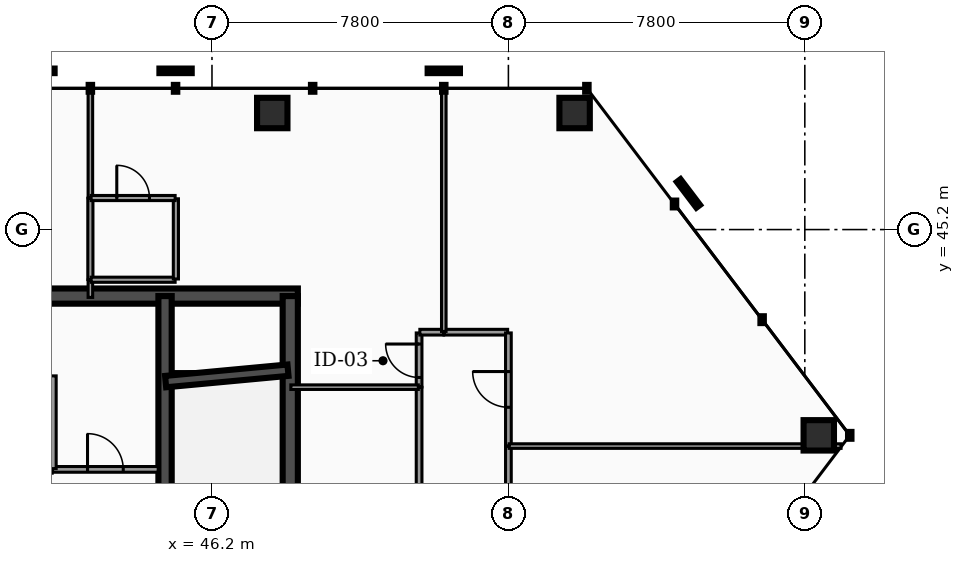
"""IFC4 building model, lengths in metres.
Left out: names, types, materials, properties, quantities, classifications, styles, units other than length and angle.
Written with IfcOpenShell. Run it as: python <this file> out.ifc"""

import sys

from ifc_helpers import new_model, si_unit, direction, frame, frame_2d, origin, origin_2d, place, context, subcontext, project, spatial, rectangle, hollow_rectangle, extrude, element, fill, save


model = new_model("IFC4")
c1 = context("Model", 3, precision=1e-05, world=origin(), true_north=direction((0.0, 1.0)))
c2 = subcontext(c1, "Body", "Model", "MODEL_VIEW")
j1 = project(units=[si_unit("LENGTHUNIT", "METRE"), si_unit("PLANEANGLEUNIT", "RADIAN")], contexts=[c1])
p1 = place(None, origin())
s1 = spatial("IfcSite", under=j1, at=p1, CompositionType="ELEMENT")
p2 = place(p1, origin())
s2 = spatial("IfcBuilding", under=s1, at=p2, CompositionType="ELEMENT")
p3 = place(p2, frame((0.0, 0.0, 160.82)))
s3 = spatial("IfcBuildingStorey", under=s2, at=p3, CompositionType="ELEMENT", Elevation=160.82)
p4 = place(p3, frame((28.4, 43.45, 0.0), z_axis=(0.0, 0.0, 1.0), x_axis=(1.0, 0.0, 0.0)))
e1 = element("IfcWall", 1, at=p4, inside=s3, PredefinedType="SHEAR", context=c2, shape_type="SweptSolid", body=[
    extrude(rectangle(XDim=20.06, YDim=0.4, at=frame_2d((10.03, 0.0))), origin(), (0.0, 0.0, 1.0), 3.5),
])
p5 = place(p3, frame((44.965, 33.25, 0.0), z_axis=(0.0, 0.0, 1.0), x_axis=(0.0, 1.0, 0.0)))
e2 = element("IfcWall", 2, at=p5, inside=s3, PredefinedType="SHEAR", context=c2, shape_type="SweptSolid", body=[
    extrude(rectangle(XDim=10.2, YDim=0.35, at=frame_2d((5.1, 0.0))), origin(), (0.0, 0.0, 1.0), 3.5),
])
p6 = place(p3, frame((48.26, 33.25, 0.0), z_axis=(0.0, 0.0, 1.0), x_axis=(0.0, 1.0, 0.0)))
e3 = element("IfcWall", 3, at=p6, inside=s3, PredefinedType="SHEAR", context=c2, shape_type="SweptSolid", body=[
    extrude(rectangle(XDim=10.2, YDim=0.4, at=frame_2d((5.1, 0.0))), origin(), (0.0, 0.0, 1.0), 3.5),
])
p7 = place(p3, frame((44.98, 41.2, 0.0), z_axis=(0.0, 0.0, 1.0), x_axis=(0.995686468965, 0.09278176286, 0.0)))
e4 = element("IfcWall", 4, at=p7, inside=s3, PredefinedType="SHEAR", context=c2, shape_type="SweptSolid", body=[
    extrude(rectangle(XDim=3.234, YDim=0.3, at=frame_2d((1.617, 0.0))), origin(), (0.0, 0.0, 1.0), 3.5),
])
p8 = place(p3, frame((55.742, 48.267, 0.0), z_axis=(0.08014844347, -0.022105121443, 0.9965378019), x_axis=(0.265875414289, 0.964007398351, 0.0)))
e5 = element("IfcColumn", 5, at=p8, inside=s3, PredefinedType="COLUMN", context=c2, shape_type="SweptSolid", body=[
    extrude(hollow_rectangle(XDim=0.8, YDim=0.8, WallThickness=0.04, at=origin_2d()), origin(), (0.0, 0.0, 1.0), 3.512),
])
p9 = place(p3, frame((47.786, 48.267, 0.0), z_axis=(0.037492293874, -0.022160872587, 0.999051161666), x_axis=(0.508837126111, 0.860862810842, 0.0)))
e6 = element("IfcColumn", 6, at=p9, inside=s3, PredefinedType="COLUMN", context=c2, shape_type="SweptSolid", body=[
    extrude(hollow_rectangle(XDim=0.8, YDim=0.8, WallThickness=0.04, at=origin_2d()), origin(), (0.0, 0.0, 1.0), 3.503),
])
p10 = place(p3, frame((62.167, 39.786, 0.0), z_axis=(0.009949439771, 0.070689725925, 0.997448731162), x_axis=(-0.990239771423, 0.139374298537, 0.0)))
e7 = element("IfcColumn", 7, at=p10, inside=s3, PredefinedType="COLUMN", context=c2, shape_type="SweptSolid", body=[
    extrude(hollow_rectangle(XDim=0.8, YDim=0.8, WallThickness=0.04, at=origin_2d()), origin(), (0.0, 0.0, 1.0), 3.509),
])
p11 = place(p3, frame((42.005, 38.89, 0.0), z_axis=(0.0, 0.0, 1.0), x_axis=(1.0, 0.0, 0.0)))
e8 = element("IfcWall", 8, at=p11, inside=s3, PredefinedType="PARTITIONING", context=c2, shape_type="SweptSolid", body=[
    extrude(rectangle(XDim=2.78, YDim=0.15, at=frame_2d((1.39, 0.0))), origin(), (0.0, 0.0, 1.0), 2.457),
])
p12 = place(p11, frame((0.92, 0.0, 0.0)))
e9 = element("IfcOpeningElement", 9, at=p12, cuts=e8, PredefinedType="OPENING", context=c2, shape_type="SweptSolid", body=[
    extrude(rectangle(XDim=0.94, YDim=2.05, at=frame_2d((0.47, 1.025))), frame((0.0, 0.085, 0.0), z_axis=(0.0, -1.0, 0.0), x_axis=(1.0, 0.0, 0.0)), (0.0, 0.0, 1.0), 0.17),
])
p13 = place(p3, frame((42.0, 38.91, 0.0), z_axis=(0.0, 0.0, 1.0), x_axis=(0.0, 1.0, 0.0)))
e10 = element("IfcWall", 10, at=p13, inside=s3, PredefinedType="PARTITIONING", context=c2, shape_type="SweptSolid", body=[
    extrude(rectangle(XDim=2.44, YDim=0.2, at=frame_2d((1.22, 0.0))), origin(), (0.0, 0.0, 1.0), 2.457),
])
p14 = place(p3, frame((54.0, 33.25, 0.0), z_axis=(0.0, 0.0, 1.0), x_axis=(0.0, 1.0, 0.0)))
e11 = element("IfcWall", 11, at=p14, inside=s3, PredefinedType="PARTITIONING", context=c2, shape_type="SweptSolid", body=[
    extrude(rectangle(XDim=6.248, YDim=0.15, at=frame_2d((3.124, 0.0))), origin(), (0.0, 0.0, 1.0), 2.457),
])
p15 = place(p14, frame((2.654, 0.0, 0.0)))
e12 = element("IfcOpeningElement", 12, at=p15, cuts=e11, PredefinedType="OPENING", context=c2, shape_type="SweptSolid", body=[
    extrude(rectangle(XDim=0.94, YDim=2.05, at=frame_2d((0.47, 1.025))), frame((0.0, 0.085, 0.0), z_axis=(0.0, -1.0, 0.0), x_axis=(1.0, 0.0, 0.0)), (0.0, 0.0, 1.0), 0.17),
])
p16 = place(p3, frame((52.305, 42.5, 0.0), z_axis=(0.0, 0.0, 1.0), x_axis=(1.0, 0.0, 0.0)))
e13 = element("IfcWall", 13, at=p16, inside=s3, PredefinedType="PARTITIONING", context=c2, shape_type="SweptSolid", body=[
    extrude(rectangle(XDim=1.675, YDim=0.15, at=frame_2d((0.837, 0.0))), origin(), (0.0, 0.0, 1.0), 2.457),
])
p17 = place(p3, frame((54.0, 39.508, 0.0), z_axis=(0.0, 0.0, 1.0), x_axis=(0.0, 1.0, 0.0)))
e14 = element("IfcWall", 14, at=p17, inside=s3, PredefinedType="PARTITIONING", context=c2, shape_type="SweptSolid", body=[
    extrude(rectangle(XDim=2.972, YDim=0.15, at=frame_2d((1.486, 0.0))), origin(), (0.0, 0.0, 1.0), 2.457),
])
p18 = place(p17, frame((1.016, 0.0, 0.0)))
e15 = element("IfcOpeningElement", 15, at=p18, cuts=e14, PredefinedType="OPENING", context=c2, shape_type="SweptSolid", body=[
    extrude(rectangle(XDim=0.94, YDim=2.05, at=frame_2d((0.47, 1.025))), frame((0.0, 0.085, 0.0), z_axis=(0.0, -1.0, 0.0), x_axis=(1.0, 0.0, 0.0)), (0.0, 0.0, 1.0), 0.17),
])
p19 = place(p3, frame((51.65, 33.27, 0.0), z_axis=(0.0, 0.0, 1.0), x_axis=(0.0, 1.0, 0.0)))
e16 = element("IfcWall", 16, at=p19, inside=s3, PredefinedType="PARTITIONING", context=c2, shape_type="SweptSolid", body=[
    extrude(rectangle(XDim=7.778, YDim=0.15, at=frame_2d((3.889, 0.0))), origin(), (0.0, 0.0, 1.0), 2.457),
])
p20 = place(p19, frame((3.419, 0.0, 0.0)))
e17 = element("IfcOpeningElement", 17, at=p20, cuts=e16, PredefinedType="OPENING", context=c2, shape_type="SweptSolid", body=[
    extrude(rectangle(XDim=0.94, YDim=2.05, at=frame_2d((0.47, 1.025))), frame((0.0, 0.085, 0.0), z_axis=(0.0, -1.0, 0.0), x_axis=(1.0, 0.0, 0.0)), (0.0, 0.0, 1.0), 0.17),
])
p21 = place(p3, frame((51.65, 41.058, 0.0), z_axis=(0.0, 0.0, 1.0), x_axis=(0.0, 1.0, 0.0)))
e18 = element("IfcWall", 18, at=p21, inside=s3, PredefinedType="PARTITIONING", context=c2, shape_type="SweptSolid", body=[
    extrude(rectangle(XDim=1.422, YDim=0.15, at=frame_2d((0.711, 0.0))), origin(), (0.0, 0.0, 1.0), 2.457),
])
p22 = place(p21, frame((0.25, 0.0, 0.0)))
e19 = element("IfcOpeningElement", 19, at=p22, cuts=e18, PredefinedType="OPENING", context=c2, shape_type="SweptSolid", body=[
    extrude(rectangle(XDim=0.88, YDim=2.05, at=frame_2d((0.44, 1.025))), frame((0.0, 0.085, 0.0), z_axis=(0.0, -1.0, 0.0), x_axis=(1.0, 0.0, 0.0)), (0.0, 0.0, 1.0), 0.17),
])
p23 = place(p3, frame((51.67, 42.5, 0.0), z_axis=(0.0, 0.0, 1.0), x_axis=(1.0, 0.0, 0.0)))
e20 = element("IfcWall", 20, at=p23, inside=s3, PredefinedType="PARTITIONING", context=c2, shape_type="SweptSolid", body=[
    extrude(rectangle(XDim=0.625, YDim=0.15, at=frame_2d((0.312, 0.0))), origin(), (0.0, 0.0, 1.0), 2.457),
])
p24 = place(p3, frame((43.0, 46.035, 0.0), z_axis=(0.0, 0.0, 1.0), x_axis=(0.0, 1.0, 0.0)))
e21 = element("IfcWall", 21, at=p24, inside=s3, PredefinedType="PARTITIONING", context=c2, shape_type="SweptSolid", body=[
    extrude(rectangle(XDim=2.867, YDim=0.12, at=frame_2d((1.433, 0.0))), origin(), (0.0, 0.0, 1.0), 2.457),
])
p25 = place(p3, frame((43.0, 43.415, 0.0), z_axis=(0.0, 0.0, 1.0), x_axis=(0.0, 1.0, 0.0)))
e22 = element("IfcWall", 22, at=p25, inside=s3, PredefinedType="PARTITIONING", context=c2, shape_type="SweptSolid", body=[
    extrude(rectangle(XDim=0.46, YDim=0.12, at=frame_2d((0.23, 0.0))), origin(), (0.0, 0.0, 1.0), 2.457),
])
p26 = place(p3, frame((43.0, 43.885, 0.0), z_axis=(0.0, 0.0, 1.0), x_axis=(0.0, 1.0, 0.0)))
e23 = element("IfcWall", 23, at=p26, inside=s3, PredefinedType="PARTITIONING", context=c2, shape_type="SweptSolid", body=[
    extrude(rectangle(XDim=2.14, YDim=0.135, at=frame_2d((1.07, 0.0))), origin(), (0.0, 0.0, 1.0), 2.457),
])
p27 = place(p3, frame((54.02, 39.503, 0.0), z_axis=(0.0, 0.0, 1.0), x_axis=(1.0, 0.0, 0.0)))
e24 = element("IfcWall", 24, at=p27, inside=s3, PredefinedType="PARTITIONING", context=c2, shape_type="SweptSolid", body=[
    extrude(rectangle(XDim=8.734, YDim=0.12, at=frame_2d((4.367, 0.0))), origin(), (0.0, 0.0, 1.0), 2.457),
])
p28 = place(p3, frame((52.3, 42.52, 0.0), z_axis=(0.0, 0.0, 1.0), x_axis=(0.0, 1.0, 0.0)))
e25 = element("IfcWall", 25, at=p28, inside=s3, PredefinedType="PARTITIONING", context=c2, shape_type="SweptSolid", body=[
    extrude(rectangle(XDim=6.382, YDim=0.12, at=frame_2d((3.191, 0.0))), origin(), (0.0, 0.0, 1.0), 2.457),
])
p29 = place(p3, frame((48.275, 41.053, 0.0), z_axis=(0.0, 0.0, 1.0), x_axis=(1.0, 0.0, 0.0)))
e26 = element("IfcWall", 26, at=p29, inside=s3, PredefinedType="PARTITIONING", context=c2, shape_type="SweptSolid", body=[
    extrude(rectangle(XDim=3.355, YDim=0.12, at=frame_2d((1.677, 0.0))), origin(), (0.0, 0.0, 1.0), 2.457),
])
p30 = place(p3, frame((43.02, 43.88, 0.0), z_axis=(0.0, 0.0, 1.0), x_axis=(1.0, 0.0, 0.0)))
e27 = element("IfcWall", 27, at=p30, inside=s3, PredefinedType="PARTITIONING", context=c2, shape_type="SweptSolid", body=[
    extrude(rectangle(XDim=2.21, YDim=0.135, at=frame_2d((1.105, 0.0))), origin(), (0.0, 0.0, 1.0), 2.457),
])
p31 = place(p3, frame((45.25, 43.9, 0.0), z_axis=(0.0, 0.0, 1.0), x_axis=(0.0, 1.0, 0.0)))
e28 = element("IfcWall", 28, at=p31, inside=s3, PredefinedType="PARTITIONING", context=c2, shape_type="SweptSolid", body=[
    extrude(rectangle(XDim=2.11, YDim=0.135, at=frame_2d((1.055, 0.0))), origin(), (0.0, 0.0, 1.0), 2.457),
])
p32 = place(p3, frame((43.02, 46.03, 0.0), z_axis=(0.0, 0.0, 1.0), x_axis=(1.0, 0.0, 0.0)))
e29 = element("IfcWall", 29, at=p32, inside=s3, PredefinedType="PARTITIONING", context=c2, shape_type="SweptSolid", body=[
    extrude(rectangle(XDim=2.21, YDim=0.135, at=frame_2d((1.105, 0.0))), origin(), (0.0, 0.0, 1.0), 2.457),
])
p33 = place(p32, frame((0.675, 0.0, 0.0)))
e30 = element("IfcOpeningElement", 30, at=p33, cuts=e29, PredefinedType="OPENING", context=c2, shape_type="SweptSolid", body=[
    extrude(rectangle(XDim=0.86, YDim=2.05, at=frame_2d((0.43, 1.025))), frame((0.0, 0.077, 0.0), z_axis=(0.0, -1.0, 0.0), x_axis=(1.0, 0.0, 0.0)), (0.0, 0.0, 1.0), 0.155),
])
p34 = place(p12, origin())
e31 = element("IfcDoor", 31, at=p34, inside=s3, OperationType="SINGLE_SWING_LEFT", PredefinedType="DOOR", context=c2, shape_type="SweptSolid", body=[
    extrude(rectangle(XDim=0.94, YDim=2.05, at=frame_2d((0.47, 1.025))), frame((0.0, 0.025, 0.0), z_axis=(0.0, -1.0, 0.0), x_axis=(1.0, 0.0, 0.0)), (0.0, 0.0, 1.0), 0.05),
])
fill(e9, e31)
p35 = place(p18, origin())
e32 = element("IfcDoor", 32, at=p35, inside=s3, OperationType="SINGLE_SWING_RIGHT", PredefinedType="DOOR", context=c2, shape_type="SweptSolid", body=[
    extrude(rectangle(XDim=0.94, YDim=2.05, at=frame_2d((0.47, 1.025))), frame((0.0, 0.025, 0.0), z_axis=(0.0, -1.0, 0.0), x_axis=(1.0, 0.0, 0.0)), (0.0, 0.0, 1.0), 0.05),
])
fill(e15, e32)
p36 = place(p22, origin())
e33 = element("IfcDoor", 33, at=p36, inside=s3, OperationType="SINGLE_SWING_RIGHT", PredefinedType="DOOR", context=c2, shape_type="SweptSolid", body=[
    extrude(rectangle(XDim=0.88, YDim=2.05, at=frame_2d((0.44, 1.025))), frame((0.0, 0.025, 0.0), z_axis=(0.0, -1.0, 0.0), x_axis=(1.0, 0.0, 0.0)), (0.0, 0.0, 1.0), 0.05),
])
fill(e19, e33)
p37 = place(p33, origin())
e34 = element("IfcDoor", 34, at=p37, inside=s3, OperationType="SINGLE_SWING_LEFT", PredefinedType="DOOR", context=c2, shape_type="SweptSolid", body=[
    extrude(rectangle(XDim=0.86, YDim=2.05, at=frame_2d((0.43, 1.025))), frame((0.0, 0.025, 0.0), z_axis=(0.0, -1.0, 0.0), x_axis=(1.0, 0.0, 0.0)), (0.0, 0.0, 1.0), 0.05),
])
fill(e30, e34)
save(model, sys.argv[1])
